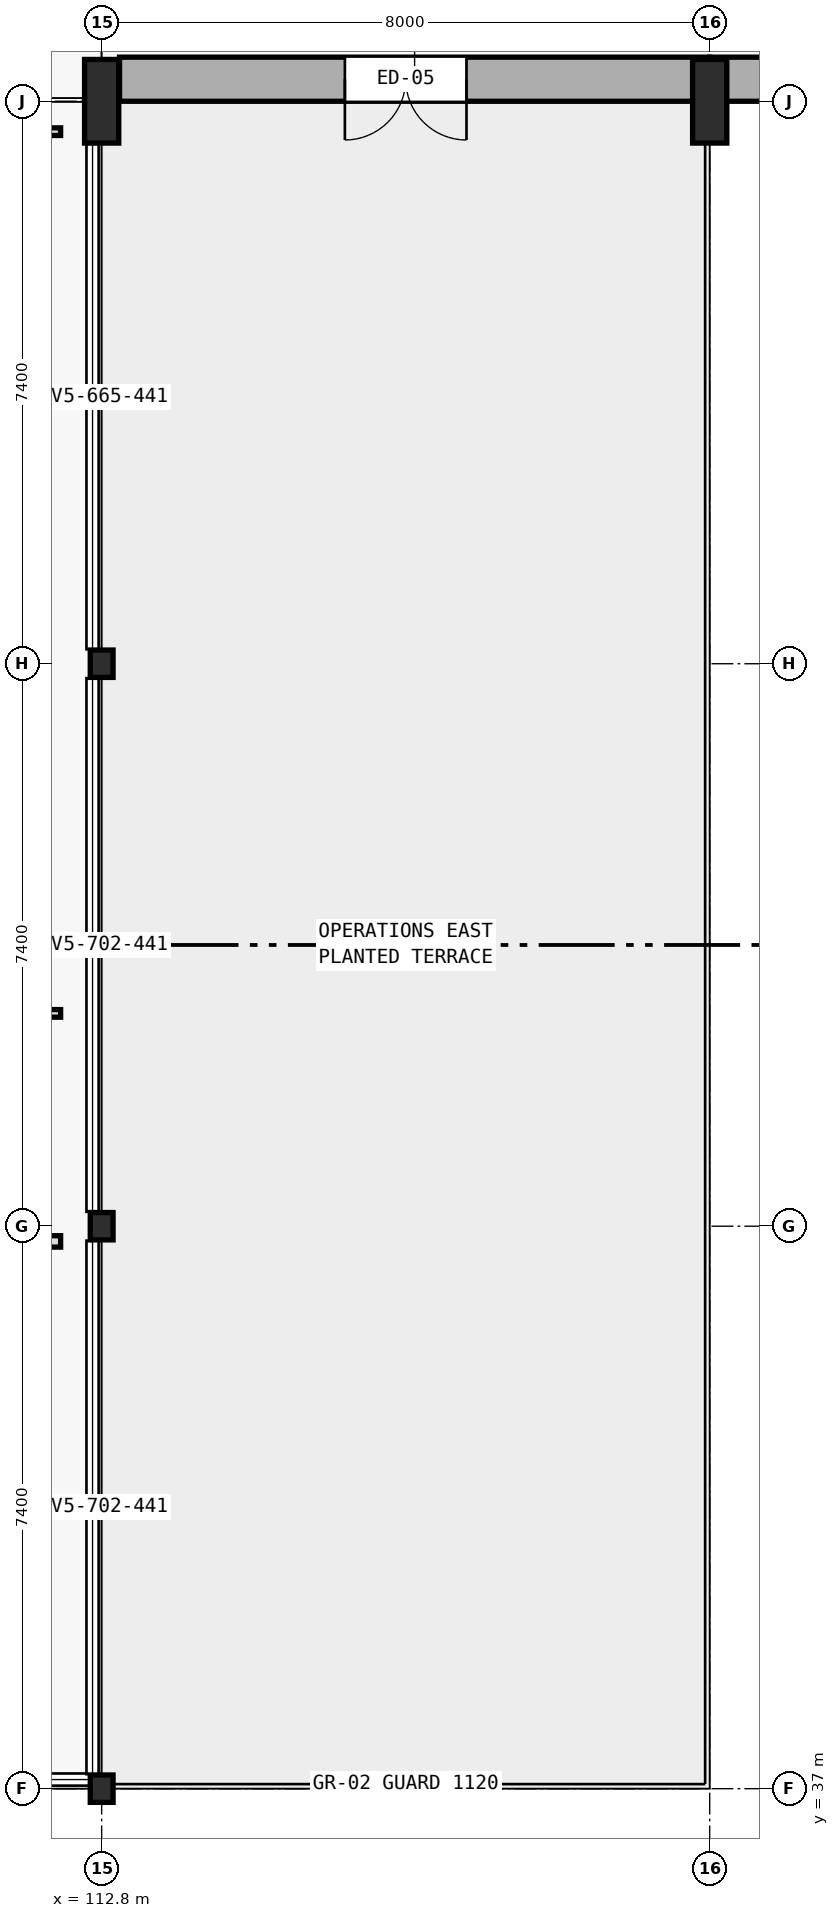
"""IFC4 building model, lengths in metres.
Left out: names, types, materials, properties, quantities, classifications, styles, units other than length and angle.
Written with IfcOpenShell. Run it as: python <this file> out.ifc"""

import sys

from ifc_helpers import new_model, si_unit, direction, frame, frame_2d, origin, origin_2d, place, context, subcontext, project, spatial, rectangle, i_section, extrude, element, fill, save


model = new_model("IFC4")
c1 = context("Model", 3, precision=1e-05, world=origin(), true_north=direction((0.0, 1.0)))
c2 = subcontext(c1, "Body", "Model", "MODEL_VIEW")
j1 = project(units=[si_unit("LENGTHUNIT", "METRE"), si_unit("PLANEANGLEUNIT", "RADIAN")], contexts=[c1])
p1 = place(None, origin())
s1 = spatial("IfcSite", under=j1, at=p1, CompositionType="ELEMENT")
p2 = place(p1, origin())
s2 = spatial("IfcBuilding", under=s1, at=p2, CompositionType="ELEMENT")
p3 = place(p2, frame((0.0, 0.0, 18.1)))
s3 = spatial("IfcBuildingStorey", under=s2, at=p3, CompositionType="ELEMENT", Elevation=18.1)
for number, where, z_axis, x_axis in (
    (1, (112.8, 37.0, 0.0), (0.0, 0.0, 1.0), (1.0, 0.0, 0.0)),
    (2, (112.8, 44.4, 0.0), (0.0, 0.0, 1.0), (1.0, 0.0, 0.0)),
    (3, (112.8, 51.8, 0.0), (0.0, 0.0, 1.0), (1.0, 0.0, 0.0)),
):
    element("IfcColumn", number, at=place(p3, frame(where, z_axis=z_axis, x_axis=x_axis)), inside=s3, PredefinedType="COLUMN", context=c2, shape_type="SweptSolid", body=[
        extrude(i_section(OverallWidth=0.3, OverallDepth=0.36, WebThickness=0.012, FlangeThickness=0.022, FilletRadius=0.027, at=origin_2d()), origin(), (0.0, 0.0, 1.0), 5.2),
    ])
for number, where, z_axis, x_axis in (
    (4, (112.8, 59.2, 0.0), (0.0, 0.0, 1.0), (1.0, 0.0, 0.0)),
    (5, (120.8, 59.2, 0.0), (0.0, 0.0, 1.0), (1.0, 0.0, 0.0)),
):
    element("IfcColumn", number, at=place(p3, frame(where, z_axis=z_axis, x_axis=x_axis)), inside=s3, PredefinedType="PILASTER", context=c2, shape_type="SweptSolid", body=[
        extrude(rectangle(XDim=0.45, YDim=1.1, at=origin_2d()), origin(), (0.0, 0.0, 1.0), 5.2),
    ])
p4 = place(p3, frame((128.3, 59.49, 0.0), z_axis=(0.0, 0.0, 1.0), x_axis=(-1.0, 0.0, 0.0)))
e6 = element("IfcWall", 6, at=p4, inside=s3, PredefinedType="STANDARD", context=c2, shape_type="SweptSolid", body=[
    extrude(rectangle(XDim=7.5, YDim=0.58, at=frame_2d((3.75, 0.0))), origin(), (0.0, 0.0, 1.0), 5.2),
])
p5 = place(p4, frame((1.745, 0.0, 0.9)))
e7 = element("IfcOpeningElement", 7, at=p5, cuts=e6, PredefinedType="OPENING", context=c2, shape_type="SweptSolid", body=[
    extrude(rectangle(XDim=0.8, YDim=1.95, at=frame_2d((0.4, 0.975))), frame((0.0, 0.3, 0.0), z_axis=(0.0, -1.0, 0.0), x_axis=(1.0, 0.0, 0.0)), (0.0, 0.0, 1.0), 0.6),
])
p6 = place(p4, frame((4.455, 0.0, 0.9)))
e8 = element("IfcOpeningElement", 8, at=p6, cuts=e6, PredefinedType="OPENING", context=c2, shape_type="SweptSolid", body=[
    extrude(rectangle(XDim=0.8, YDim=1.95, at=frame_2d((0.4, 0.975))), frame((0.0, 0.3, 0.0), z_axis=(0.0, -1.0, 0.0), x_axis=(1.0, 0.0, 0.0)), (0.0, 0.0, 1.0), 0.6),
])
p7 = place(p3, frame((120.8, 59.49, 0.0), z_axis=(0.0, 0.0, 1.0), x_axis=(-1.0, 0.0, 0.0)))
e9 = element("IfcWall", 9, at=p7, inside=s3, PredefinedType="STANDARD", context=c2, shape_type="SweptSolid", body=[
    extrude(rectangle(XDim=7.765, YDim=0.58, at=frame_2d((3.883, 0.0))), origin(), (0.0, 0.0, 1.0), 5.2),
])
p8 = place(p7, frame((3.2, 0.0, 0.0)))
e10 = element("IfcOpeningElement", 10, at=p8, cuts=e9, PredefinedType="OPENING", context=c2, shape_type="SweptSolid", body=[
    extrude(rectangle(XDim=1.6, YDim=2.3, at=frame_2d((0.8, 1.15))), frame((0.0, 0.3, 0.0), z_axis=(0.0, -1.0, 0.0), x_axis=(1.0, 0.0, 0.0)), (0.0, 0.0, 1.0), 0.6),
])
p9 = place(p3, frame((78.14, 44.2, 0.0), z_axis=(0.0, 0.0, 1.0), x_axis=(1.0, 0.0, 0.0)))
e11 = element("IfcWall", 11, at=p9, inside=s3, PredefinedType="PARTITIONING", context=c2, shape_type="SweptSolid", body=[
    extrude(rectangle(XDim=34.12, YDim=0.15, at=frame_2d((17.06, 0.0))), origin(), (0.0, 0.0, 1.0), 4.4),
])
p10 = place(p9, frame((21.478, 0.0, 0.0)))
e12 = element("IfcOpeningElement", 12, at=p10, cuts=e11, PredefinedType="OPENING", context=c2, shape_type="SweptSolid", body=[
    extrude(rectangle(XDim=1.4, YDim=2.2, at=frame_2d((0.7, 1.1))), frame((0.0, 0.085, 0.0), z_axis=(0.0, -1.0, 0.0), x_axis=(1.0, 0.0, 0.0)), (0.0, 0.0, 1.0), 0.17),
])
p11 = place(p3, frame((95.94, 47.2, 0.0), z_axis=(0.0, 0.0, 1.0), x_axis=(1.0, 0.0, 0.0)))
e13 = element("IfcWall", 13, at=p11, inside=s3, PredefinedType="PARTITIONING", context=c2, shape_type="SweptSolid", body=[
    extrude(rectangle(XDim=16.32, YDim=0.1, at=frame_2d((8.16, 0.0))), origin(), (0.0, 0.0, 1.0), 4.4),
])
p12 = place(p11, frame((7.46, 0.0, 0.0)))
e14 = element("IfcOpeningElement", 14, at=p12, cuts=e13, PredefinedType="OPENING", context=c2, shape_type="SweptSolid", body=[
    extrude(rectangle(XDim=1.4, YDim=2.2, at=frame_2d((0.7, 1.1))), frame((0.0, 0.06, 0.0), z_axis=(0.0, -1.0, 0.0), x_axis=(1.0, 0.0, 0.0)), (0.0, 0.0, 1.0), 0.12),
])
p13 = place(p3, frame((95.94, 58.8, 0.0), z_axis=(0.0, 0.0, 1.0), x_axis=(1.0, 0.0, 0.0)))
e15 = element("IfcWall", 15, at=p13, inside=s3, PredefinedType="PARTITIONING", context=c2, shape_type="SweptSolid", body=[
    extrude(rectangle(XDim=16.32, YDim=0.1, at=frame_2d((8.16, 0.0))), origin(), (0.0, 0.0, 1.0), 4.4),
])
p14 = place(p8, origin())
e16 = element("IfcDoor", 16, at=p14, inside=s3, OperationType="DOUBLE_DOOR_SINGLE_SWING", PredefinedType="DOOR", context=c2, shape_type="SweptSolid", body=[
    extrude(rectangle(XDim=1.6, YDim=2.3, at=frame_2d((0.8, 1.15))), frame((0.0, 0.025, 0.0), z_axis=(0.0, -1.0, 0.0), x_axis=(1.0, 0.0, 0.0)), (0.0, 0.0, 1.0), 0.05),
])
fill(e10, e16)
save(model, sys.argv[1])
